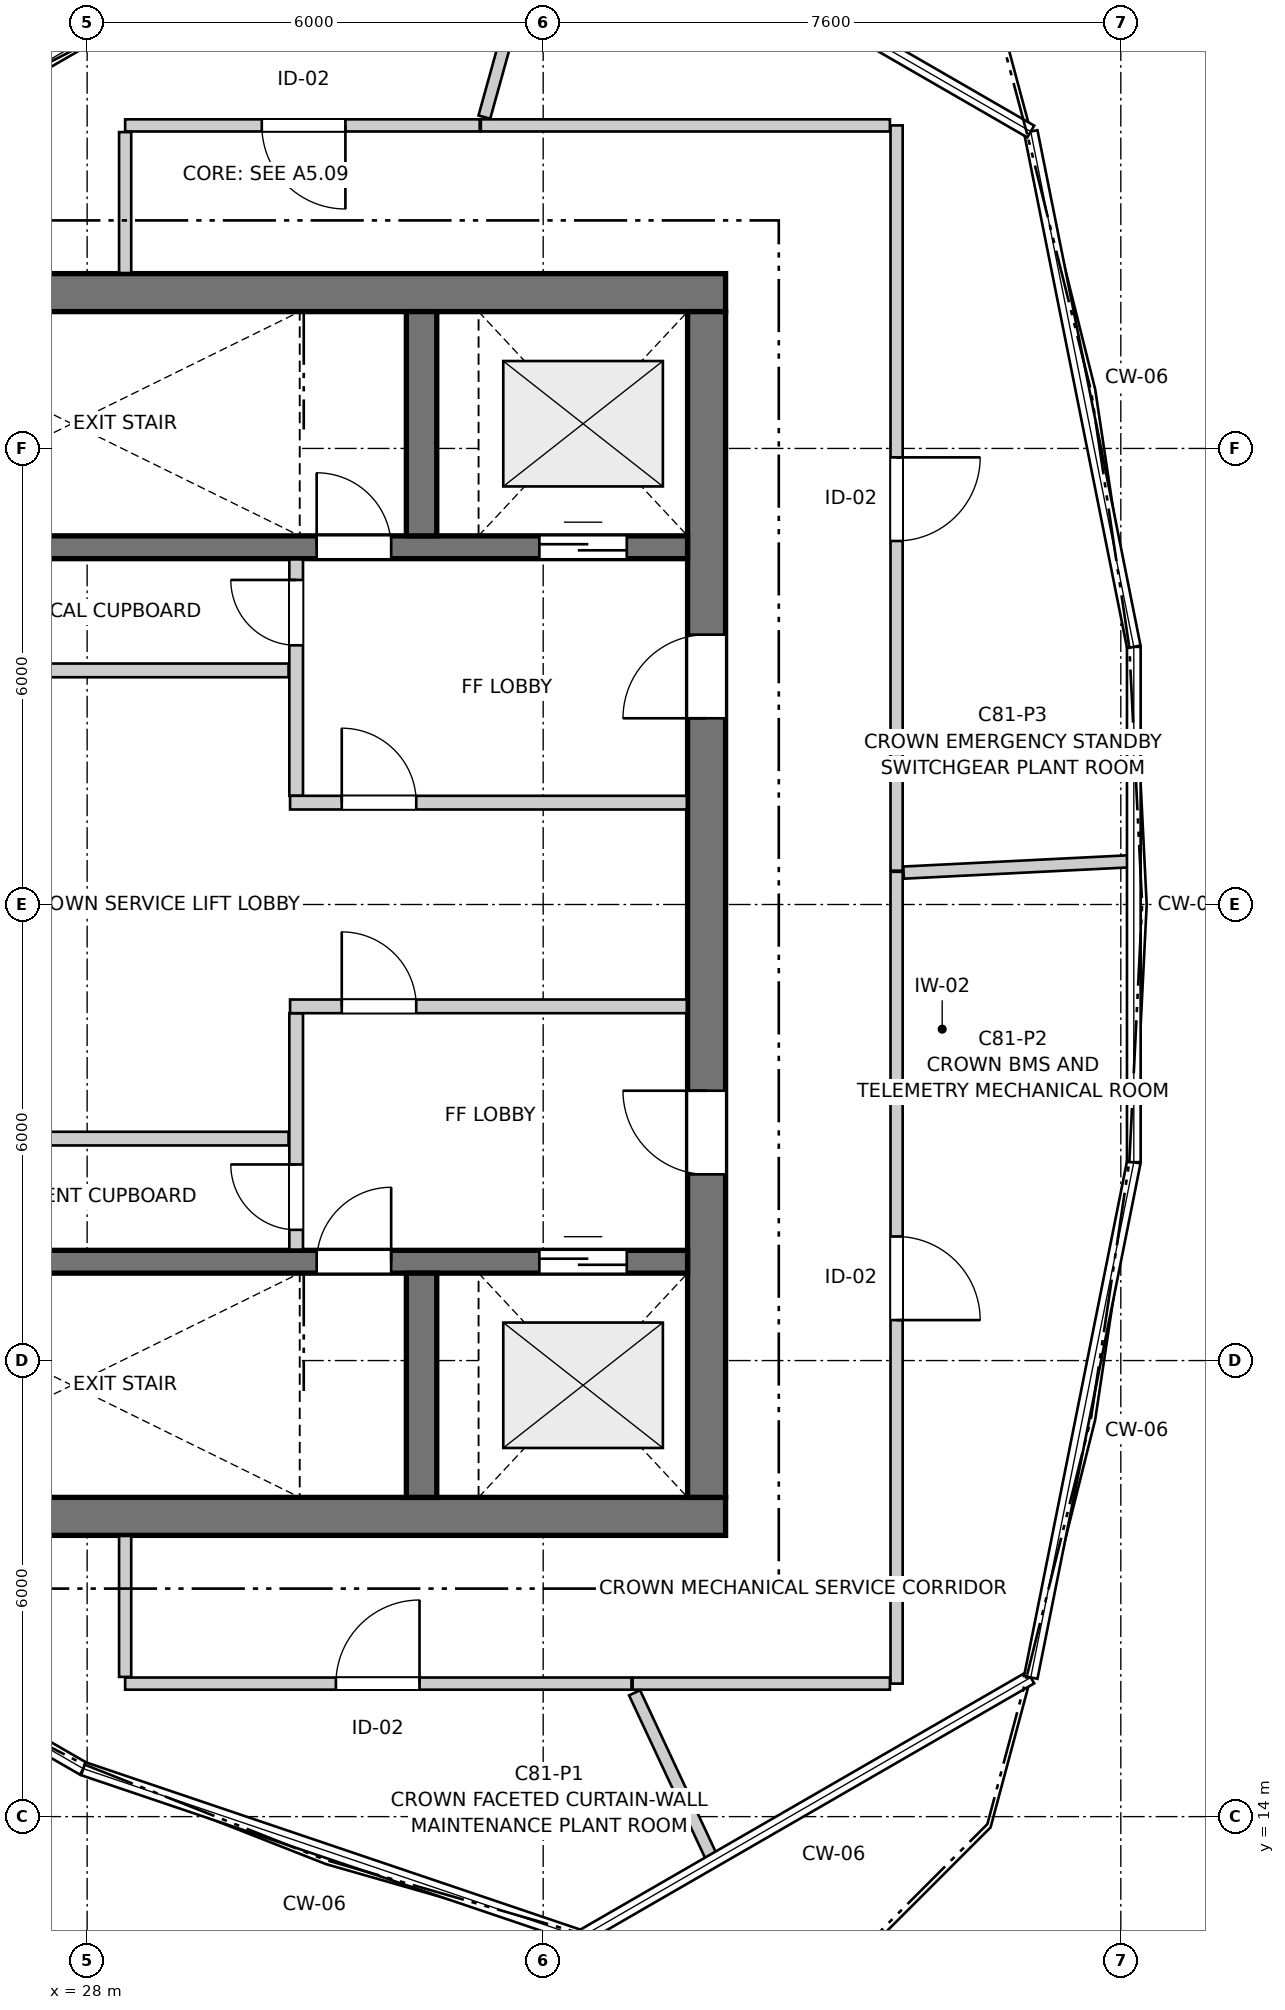
"""IFC4 building model, lengths in metres.
Left out: names, types, materials, properties, quantities, classifications, styles, units other than length and angle.
Written with IfcOpenShell. Run it as: python <this file> out.ifc"""

import sys

from ifc_helpers import new_model, si_unit, direction, frame, frame_2d, origin, place, context, subcontext, project, spatial, rectangle, extrude, source, transform, mapped, element, fill, save


model = new_model("IFC4")
c1 = context("Model", 3, precision=1e-05, world=origin(), true_north=direction((0.0, 1.0)))
c2 = subcontext(c1, "Body", "Model", "MODEL_VIEW")
j1 = project(units=[si_unit("LENGTHUNIT", "METRE"), si_unit("PLANEANGLEUNIT", "RADIAN")], contexts=[c1])
p1 = place(None, origin())
s1 = spatial("IfcSite", under=j1, at=p1, CompositionType="ELEMENT")
p2 = place(p1, origin())
s2 = spatial("IfcBuilding", under=s1, at=p2, CompositionType="ELEMENT")
p3 = place(p2, frame((0.0, 0.0, 274.7)))
s3 = spatial("IfcBuildingStorey", under=s2, at=p3, CompositionType="ELEMENT", Elevation=274.7)
for number, where, z_axis, x_axis in (
    (1, (24.3, 17.95, 0.0), (0.0, 0.0, 1.0), (1.0, 0.0, 0.0)),
    (2, (36.4, 34.05, 0.0), (0.0, 0.0, 1.0), (-1.0, 0.0, 0.0)),
):
    element("IfcWall", number, at=place(p3, frame(where, z_axis=z_axis, x_axis=x_axis)), inside=s3, PredefinedType="SHEAR", context=c2, shape_type="SweptSolid", body=[
        extrude(rectangle(XDim=12.1, YDim=0.5, at=frame_2d((6.05, 0.0))), origin(), (0.0, 0.0, 1.0), 3.062),
    ])
p4 = place(p3, frame((36.15, 18.2, 0.0), z_axis=(0.0, 0.0, 1.0), x_axis=(0.0, 1.0, 0.0)))
e3 = element("IfcWall", 3, at=p4, inside=s3, PredefinedType="SHEAR", context=c2, shape_type="SweptSolid", body=[
    extrude(rectangle(XDim=15.6, YDim=0.5, at=frame_2d((7.8, 0.0))), origin(), (0.0, 0.0, 1.0), 3.062),
])
p5 = place(p4, frame((4.25, 0.0, 0.0)))
e4 = element("IfcOpeningElement", 4, at=p5, cuts=e3, PredefinedType="OPENING", context=c2, shape_type="SweptSolid", body=[
    extrude(rectangle(XDim=1.1, YDim=2.15, at=frame_2d((0.55, 1.075))), frame((0.0, 0.26, 0.0), z_axis=(0.0, -1.0, 0.0), x_axis=(1.0, 0.0, 0.0)), (0.0, 0.0, 1.0), 0.52),
])
p6 = place(p4, frame((10.25, 0.0, 0.0)))
e5 = element("IfcOpeningElement", 5, at=p6, cuts=e3, PredefinedType="OPENING", context=c2, shape_type="SweptSolid", body=[
    extrude(rectangle(XDim=1.1, YDim=2.15, at=frame_2d((0.55, 1.075))), frame((0.0, 0.26, 0.0), z_axis=(0.0, -1.0, 0.0), x_axis=(1.0, 0.0, 0.0)), (0.0, 0.0, 1.0), 0.52),
])
p7 = place(p3, frame((24.8, 21.3, 0.0), z_axis=(0.0, 0.0, 1.0), x_axis=(1.0, 0.0, 0.0)))
e6 = element("IfcWall", 6, at=p7, inside=s3, PredefinedType="SHEAR", context=c2, shape_type="SweptSolid", body=[
    extrude(rectangle(XDim=11.1, YDim=0.3, at=frame_2d((5.55, 0.0))), origin(), (0.0, 0.0, 1.0), 3.062),
])
p8 = place(p7, frame((6.22, 0.0, 0.0)))
e7 = element("IfcOpeningElement", 7, at=p8, cuts=e6, PredefinedType="OPENING", context=c2, shape_type="SweptSolid", body=[
    extrude(rectangle(XDim=0.98, YDim=2.15, at=frame_2d((0.49, 1.075))), frame((0.0, 0.16, 0.0), z_axis=(0.0, -1.0, 0.0), x_axis=(1.0, 0.0, 0.0)), (0.0, 0.0, 1.0), 0.32),
])
p9 = place(p7, frame((9.15, 0.0, 0.0)))
e8 = element("IfcOpeningElement", 8, at=p9, cuts=e6, PredefinedType="OPENING", context=c2, shape_type="SweptSolid", body=[
    extrude(rectangle(XDim=1.15, YDim=2.15, at=frame_2d((0.575, 1.075))), frame((0.0, 0.16, 0.0), z_axis=(0.0, -1.0, 0.0), x_axis=(1.0, 0.0, 0.0)), (0.0, 0.0, 1.0), 0.32),
])
p10 = place(p3, frame((32.4, 18.2, 0.0), z_axis=(0.0, 0.0, 1.0), x_axis=(0.0, 1.0, 0.0)))
e9 = element("IfcWall", 9, at=p10, inside=s3, PredefinedType="SHEAR", context=c2, shape_type="SweptSolid", body=[
    extrude(rectangle(XDim=2.95, YDim=0.4, at=frame_2d((1.475, 0.0))), origin(), (0.0, 0.0, 1.0), 3.062),
])
p11 = place(p3, frame((24.8, 30.7, 0.0), z_axis=(0.0, 0.0, 1.0), x_axis=(1.0, 0.0, 0.0)))
e10 = element("IfcWall", 10, at=p11, inside=s3, PredefinedType="SHEAR", context=c2, shape_type="SweptSolid", body=[
    extrude(rectangle(XDim=11.1, YDim=0.3, at=frame_2d((5.55, 0.0))), origin(), (0.0, 0.0, 1.0), 3.062),
])
p12 = place(p11, frame((6.22, 0.0, 0.0)))
e11 = element("IfcOpeningElement", 11, at=p12, cuts=e10, PredefinedType="OPENING", context=c2, shape_type="SweptSolid", body=[
    extrude(rectangle(XDim=0.98, YDim=2.15, at=frame_2d((0.49, 1.075))), frame((0.0, 0.16, 0.0), z_axis=(0.0, -1.0, 0.0), x_axis=(1.0, 0.0, 0.0)), (0.0, 0.0, 1.0), 0.32),
])
p13 = place(p11, frame((9.15, 0.0, 0.0)))
e12 = element("IfcOpeningElement", 12, at=p13, cuts=e10, PredefinedType="OPENING", context=c2, shape_type="SweptSolid", body=[
    extrude(rectangle(XDim=1.15, YDim=2.15, at=frame_2d((0.575, 1.075))), frame((0.0, 0.16, 0.0), z_axis=(0.0, -1.0, 0.0), x_axis=(1.0, 0.0, 0.0)), (0.0, 0.0, 1.0), 0.32),
])
p14 = place(p3, frame((32.4, 30.85, 0.0), z_axis=(0.0, 0.0, 1.0), x_axis=(0.0, 1.0, 0.0)))
e13 = element("IfcWall", 13, at=p14, inside=s3, PredefinedType="SHEAR", context=c2, shape_type="SweptSolid", body=[
    extrude(rectangle(XDim=2.95, YDim=0.4, at=frame_2d((1.475, 0.0))), origin(), (0.0, 0.0, 1.0), 3.062),
])
p15 = place(p3, frame((30.75, 21.46, 0.0), z_axis=(0.0, 0.0, 1.0), x_axis=(0.0, 1.0, 0.0)))
e14 = element("IfcWall", 14, at=p15, inside=s3, PredefinedType="PARTITIONING", context=c2, shape_type="SweptSolid", body=[
    extrude(rectangle(XDim=3.11, YDim=0.18, at=frame_2d((1.555, 0.0))), origin(), (0.0, 0.0, 1.0), 2.23),
])
p16 = place(p15, frame((0.26, 0.0, 0.0)))
e15 = element("IfcOpeningElement", 15, at=p16, cuts=e14, PredefinedType="OPENING", context=c2, shape_type="SweptSolid", body=[
    extrude(rectangle(XDim=0.86, YDim=2.05, at=frame_2d((0.43, 1.025))), frame((0.0, 0.1, 0.0), z_axis=(0.0, -1.0, 0.0), x_axis=(1.0, 0.0, 0.0)), (0.0, 0.0, 1.0), 0.2),
])
p17 = place(p3, frame((30.67, 24.66, 0.0), z_axis=(0.0, 0.0, 1.0), x_axis=(1.0, 0.0, 0.0)))
e16 = element("IfcWall", 16, at=p17, inside=s3, PredefinedType="PARTITIONING", context=c2, shape_type="SweptSolid", body=[
    extrude(rectangle(XDim=5.22, YDim=0.18, at=frame_2d((2.61, 0.0))), origin(), (0.0, 0.0, 1.0), 2.23),
])
p18 = place(p17, frame((0.68, 0.0, 0.0)))
e17 = element("IfcOpeningElement", 17, at=p18, cuts=e16, PredefinedType="OPENING", context=c2, shape_type="SweptSolid", body=[
    extrude(rectangle(XDim=0.98, YDim=2.15, at=frame_2d((0.49, 1.075))), frame((0.0, 0.1, 0.0), z_axis=(0.0, -1.0, 0.0), x_axis=(1.0, 0.0, 0.0)), (0.0, 0.0, 1.0), 0.2),
])
p19 = place(p3, frame((30.75, 27.43, 0.0), z_axis=(0.0, 0.0, 1.0), x_axis=(0.0, 1.0, 0.0)))
e18 = element("IfcWall", 18, at=p19, inside=s3, PredefinedType="PARTITIONING", context=c2, shape_type="SweptSolid", body=[
    extrude(rectangle(XDim=3.11, YDim=0.18, at=frame_2d((1.555, 0.0))), origin(), (0.0, 0.0, 1.0), 2.23),
])
p20 = place(p19, frame((1.98, 0.0, 0.0)))
e19 = element("IfcOpeningElement", 19, at=p20, cuts=e18, PredefinedType="OPENING", context=c2, shape_type="SweptSolid", body=[
    extrude(rectangle(XDim=0.86, YDim=2.05, at=frame_2d((0.43, 1.025))), frame((0.0, 0.1, 0.0), z_axis=(0.0, -1.0, 0.0), x_axis=(1.0, 0.0, 0.0)), (0.0, 0.0, 1.0), 0.2),
])
p21 = place(p3, frame((30.67, 27.34, 0.0), z_axis=(0.0, 0.0, 1.0), x_axis=(1.0, 0.0, 0.0)))
e20 = element("IfcWall", 20, at=p21, inside=s3, PredefinedType="PARTITIONING", context=c2, shape_type="SweptSolid", body=[
    extrude(rectangle(XDim=5.22, YDim=0.18, at=frame_2d((2.61, 0.0))), origin(), (0.0, 0.0, 1.0), 2.23),
])
p22 = place(p21, frame((0.68, 0.0, 0.0)))
e21 = element("IfcOpeningElement", 21, at=p22, cuts=e20, PredefinedType="OPENING", context=c2, shape_type="SweptSolid", body=[
    extrude(rectangle(XDim=0.98, YDim=2.15, at=frame_2d((0.49, 1.075))), frame((0.0, 0.1, 0.0), z_axis=(0.0, -1.0, 0.0), x_axis=(1.0, 0.0, 0.0)), (0.0, 0.0, 1.0), 0.2),
])
for number, where, z_axis, x_axis in (
    (22, (24.81, 22.92, 0.0), (0.0, 0.0, 1.0), (1.0, 0.0, 0.0)),
    (23, (24.81, 29.08, 0.0), (0.0, 0.0, 1.0), (1.0, 0.0, 0.0)),
):
    element("IfcWall", number, at=place(p3, frame(where, z_axis=z_axis, x_axis=x_axis)), inside=s3, PredefinedType="PARTITIONING", context=c2, shape_type="SweptSolid", body=[
        extrude(rectangle(XDim=5.84, YDim=0.18, at=frame_2d((2.92, 0.0))), origin(), (0.0, 0.0, 1.0), 2.23),
    ])
p23 = place(p3, frame((38.65, 26.43, 0.0), z_axis=(0.0, 0.0, 1.0), x_axis=(0.0, -1.0, 0.0)))
e24 = element("IfcWall", 24, at=p23, inside=s3, PredefinedType="PARTITIONING", context=c2, shape_type="SweptSolid", body=[
    extrude(rectangle(XDim=10.68, YDim=0.16, at=frame_2d((5.34, 0.0))), origin(), (0.0, 0.0, 1.0), 2.23),
])
p24 = place(p23, frame((4.798, 0.0, 0.0)))
e25 = element("IfcOpeningElement", 25, at=p24, cuts=e24, PredefinedType="OPENING", context=c2, shape_type="SweptSolid", body=[
    extrude(rectangle(XDim=1.1, YDim=2.15, at=frame_2d((0.55, 1.075))), frame((0.0, 0.09, 0.0), z_axis=(0.0, -1.0, 0.0), x_axis=(1.0, 0.0, 0.0)), (0.0, 0.0, 1.0), 0.18),
])
p25 = place(p3, frame((38.65, 36.25, 0.0), z_axis=(0.0, 0.0, 1.0), x_axis=(0.0, -1.0, 0.0)))
e26 = element("IfcWall", 26, at=p25, inside=s3, PredefinedType="PARTITIONING", context=c2, shape_type="SweptSolid", body=[
    extrude(rectangle(XDim=9.805, YDim=0.16, at=frame_2d((4.902, 0.0))), origin(), (0.0, 0.0, 1.0), 2.23),
])
p26 = place(p25, frame((4.367, 0.0, 0.0)))
e27 = element("IfcOpeningElement", 27, at=p26, cuts=e26, PredefinedType="OPENING", context=c2, shape_type="SweptSolid", body=[
    extrude(rectangle(XDim=1.1, YDim=2.15, at=frame_2d((0.55, 1.075))), frame((0.0, 0.09, 0.0), z_axis=(0.0, -1.0, 0.0), x_axis=(1.0, 0.0, 0.0)), (0.0, 0.0, 1.0), 0.18),
])
p27 = place(p3, frame((28.5, 15.75, 0.0), z_axis=(0.0, 0.0, 1.0), x_axis=(1.0, 0.0, 0.0)))
e28 = element("IfcWall", 28, at=p27, inside=s3, PredefinedType="PARTITIONING", context=c2, shape_type="SweptSolid", body=[
    extrude(rectangle(XDim=6.662, YDim=0.16, at=frame_2d((3.331, 0.0))), origin(), (0.0, 0.0, 1.0), 2.23),
])
p28 = place(p27, frame((2.773, 0.0, 0.0)))
e29 = element("IfcOpeningElement", 29, at=p28, cuts=e28, PredefinedType="OPENING", context=c2, shape_type="SweptSolid", body=[
    extrude(rectangle(XDim=1.1, YDim=2.15, at=frame_2d((0.55, 1.075))), frame((0.0, 0.09, 0.0), z_axis=(0.0, -1.0, 0.0), x_axis=(1.0, 0.0, 0.0)), (0.0, 0.0, 1.0), 0.18),
])
p29 = place(p3, frame((33.165, 36.25, 0.0), z_axis=(0.0, 0.0, 1.0), x_axis=(-1.0, 0.0, 0.0)))
e30 = element("IfcWall", 30, at=p29, inside=s3, PredefinedType="PARTITIONING", context=c2, shape_type="SweptSolid", body=[
    extrude(rectangle(XDim=4.665, YDim=0.16, at=frame_2d((2.333, 0.0))), origin(), (0.0, 0.0, 1.0), 2.23),
])
p30 = place(p29, frame((1.767, 0.0, 0.0)))
e31 = element("IfcOpeningElement", 31, at=p30, cuts=e30, PredefinedType="OPENING", context=c2, shape_type="SweptSolid", body=[
    extrude(rectangle(XDim=1.1, YDim=2.15, at=frame_2d((0.55, 1.075))), frame((0.0, 0.09, 0.0), z_axis=(0.0, -1.0, 0.0), x_axis=(1.0, 0.0, 0.0)), (0.0, 0.0, 1.0), 0.18),
])
p31 = place(p3, frame((33.18, 36.25, 0.0), z_axis=(0.0, 0.0, 1.0), x_axis=(1.0, 0.0, 0.0)))
e32 = element("IfcWall", 32, at=p31, inside=s3, PredefinedType="PARTITIONING", context=c2, shape_type="SweptSolid", body=[
    extrude(rectangle(XDim=5.382, YDim=0.16, at=frame_2d((2.691, 0.0))), origin(), (0.0, 0.0, 1.0), 2.23),
])
p32 = place(p3, frame((35.177, 15.75, 0.0), z_axis=(0.0, 0.0, 1.0), x_axis=(1.0, 0.0, 0.0)))
e33 = element("IfcWall", 33, at=p32, inside=s3, PredefinedType="PARTITIONING", context=c2, shape_type="SweptSolid", body=[
    extrude(rectangle(XDim=3.385, YDim=0.16, at=frame_2d((1.692, 0.0))), origin(), (0.0, 0.0, 1.0), 2.23),
])
p33 = place(p3, frame((33.226, 36.359, 0.0), z_axis=(0.0, 0.0, 1.0), x_axis=(0.267310296681, 0.96361050497, 0.0)))
e34 = element("IfcWall", 34, at=p33, inside=s3, PredefinedType="PARTITIONING", context=c2, shape_type="SweptSolid", body=[
    extrude(rectangle(XDim=3.171, YDim=0.16, at=frame_2d((1.585, 0.0))), origin(), (0.0, 0.0, 1.0), 2.23),
])
p34 = place(p3, frame((38.742, 26.42, 0.0), z_axis=(0.0, 0.0, 1.0), x_axis=(0.998747676097, 0.050030785433, 0.0)))
e35 = element("IfcWall", 35, at=p34, inside=s3, PredefinedType="PARTITIONING", context=c2, shape_type="SweptSolid", body=[
    extrude(rectangle(XDim=3.006, YDim=0.16, at=frame_2d((1.503, 0.0))), origin(), (0.0, 0.0, 1.0), 2.23),
])
p35 = place(p3, frame((35.203, 15.629, 0.0), z_axis=(0.0, 0.0, 1.0), x_axis=(0.423632901081, -0.905833961122, 0.0)))
e36 = element("IfcWall", 36, at=p35, inside=s3, PredefinedType="PARTITIONING", context=c2, shape_type="SweptSolid", body=[
    extrude(rectangle(XDim=2.414, YDim=0.16, at=frame_2d((1.207, 0.0))), origin(), (0.0, 0.0, 1.0), 2.23),
])
for number, where, z_axis, x_axis in (
    (37, (28.5, 34.308, 0.0), (0.0, 0.0, 1.0), (0.0, 1.0, 0.0)),
    (38, (28.5, 15.838, 0.0), (0.0, 0.0, 1.0), (0.0, 1.0, 0.0)),
):
    element("IfcWall", number, at=place(p3, frame(where, z_axis=z_axis, x_axis=x_axis)), inside=s3, PredefinedType="PARTITIONING", context=c2, shape_type="SweptSolid", body=[
        extrude(rectangle(XDim=1.854, YDim=0.16, at=frame_2d((0.927, 0.0))), origin(), (0.0, 0.0, 1.0), 2.23),
    ])
m1 = source(origin(), c2, "Body", "SweptSolid", [
    extrude(rectangle(XDim=0.98, YDim=2.15, at=frame_2d((0.49, 1.075))), frame((0.0, 0.025, 0.0), z_axis=(0.0, -1.0, 0.0), x_axis=(1.0, 0.0, 0.0)), (0.0, 0.0, 1.0), 0.05),
])
p36 = place(p8, origin())
e39 = element("IfcDoor", 39, at=p36, inside=s3, OperationType="SINGLE_SWING_RIGHT", PredefinedType="DOOR", context=c2, shape_type="MappedRepresentation", body=[
    mapped(m1, transform((0.0, 0.0, 0.0), x_axis=(1.0, 0.0, 0.0), y_axis=(0.0, 1.0, 0.0), z_axis=(0.0, 0.0, 1.0), scale=1.0)),
])
fill(e7, e39)
m2 = source(origin(), c2, "Body", "SweptSolid", [
    extrude(rectangle(XDim=1.15, YDim=2.15, at=frame_2d((0.575, 1.075))), frame((0.0, 0.025, 0.0), z_axis=(0.0, -1.0, 0.0), x_axis=(1.0, 0.0, 0.0)), (0.0, 0.0, 1.0), 0.05),
])
p37 = place(p9, origin())
e40 = element("IfcDoor", 40, at=p37, inside=s3, OperationType="DOUBLE_DOOR_SLIDING", PredefinedType="DOOR", context=c2, shape_type="MappedRepresentation", body=[
    mapped(m2, transform((0.0, 0.0, 0.0), x_axis=(1.0, 0.0, 0.0), y_axis=(0.0, 1.0, 0.0), z_axis=(0.0, 0.0, 1.0), scale=1.0)),
])
fill(e8, e40)
p38 = place(p12, origin())
e41 = element("IfcDoor", 41, at=p38, inside=s3, OperationType="SINGLE_SWING_LEFT", PredefinedType="DOOR", context=c2, shape_type="MappedRepresentation", body=[
    mapped(m1, transform((0.0, 0.0, 0.0), x_axis=(1.0, 0.0, 0.0), y_axis=(0.0, 1.0, 0.0), z_axis=(0.0, 0.0, 1.0), scale=1.0)),
])
fill(e11, e41)
p39 = place(p13, origin())
e42 = element("IfcDoor", 42, at=p39, inside=s3, OperationType="DOUBLE_DOOR_SLIDING", PredefinedType="DOOR", context=c2, shape_type="MappedRepresentation", body=[
    mapped(m2, transform((0.0, 0.0, 0.0), x_axis=(1.0, 0.0, 0.0), y_axis=(0.0, 1.0, 0.0), z_axis=(0.0, 0.0, 1.0), scale=1.0)),
])
fill(e12, e42)
m3 = source(origin(), c2, "Body", "SweptSolid", [
    extrude(rectangle(XDim=1.1, YDim=2.15, at=frame_2d((0.55, 1.075))), frame((0.0, 0.025, 0.0), z_axis=(0.0, -1.0, 0.0), x_axis=(1.0, 0.0, 0.0)), (0.0, 0.0, 1.0), 0.05),
])
p40 = place(p5, origin())
e43 = element("IfcDoor", 43, at=p40, inside=s3, OperationType="SINGLE_SWING_RIGHT", PredefinedType="DOOR", context=c2, shape_type="MappedRepresentation", body=[
    mapped(m3, transform((0.0, 0.0, 0.0), x_axis=(1.0, 0.0, 0.0), y_axis=(0.0, 1.0, 0.0), z_axis=(0.0, 0.0, 1.0), scale=1.0)),
])
fill(e4, e43)
p41 = place(p6, origin())
e44 = element("IfcDoor", 44, at=p41, inside=s3, OperationType="SINGLE_SWING_LEFT", PredefinedType="DOOR", context=c2, shape_type="MappedRepresentation", body=[
    mapped(m3, transform((0.0, 0.0, 0.0), x_axis=(1.0, 0.0, 0.0), y_axis=(0.0, 1.0, 0.0), z_axis=(0.0, 0.0, 1.0), scale=1.0)),
])
fill(e5, e44)
m4 = source(origin(), c2, "Body", "SweptSolid", [
    extrude(rectangle(XDim=0.86, YDim=2.05, at=frame_2d((0.43, 1.025))), frame((0.0, 0.025, 0.0), z_axis=(0.0, -1.0, 0.0), x_axis=(1.0, 0.0, 0.0)), (0.0, 0.0, 1.0), 0.05),
])
p42 = place(p16, origin())
e45 = element("IfcDoor", 45, at=p42, inside=s3, OperationType="SINGLE_SWING_RIGHT", PredefinedType="DOOR", context=c2, shape_type="MappedRepresentation", body=[
    mapped(m4, transform((0.0, 0.0, 0.0), x_axis=(1.0, 0.0, 0.0), y_axis=(0.0, 1.0, 0.0), z_axis=(0.0, 0.0, 1.0), scale=1.0)),
])
fill(e15, e45)
p43 = place(p18, origin())
e46 = element("IfcDoor", 46, at=p43, inside=s3, OperationType="SINGLE_SWING_LEFT", PredefinedType="DOOR", context=c2, shape_type="MappedRepresentation", body=[
    mapped(m1, transform((0.0, 0.0, 0.0), x_axis=(1.0, 0.0, 0.0), y_axis=(0.0, 1.0, 0.0), z_axis=(0.0, 0.0, 1.0), scale=1.0)),
])
fill(e17, e46)
p44 = place(p20, origin())
e47 = element("IfcDoor", 47, at=p44, inside=s3, OperationType="SINGLE_SWING_RIGHT", PredefinedType="DOOR", context=c2, shape_type="MappedRepresentation", body=[
    mapped(m4, transform((0.0, 0.0, 0.0), x_axis=(1.0, 0.0, 0.0), y_axis=(0.0, 1.0, 0.0), z_axis=(0.0, 0.0, 1.0), scale=1.0)),
])
fill(e19, e47)
p45 = place(p22, origin())
e48 = element("IfcDoor", 48, at=p45, inside=s3, OperationType="SINGLE_SWING_LEFT", PredefinedType="DOOR", context=c2, shape_type="MappedRepresentation", body=[
    mapped(m1, transform((0.0, 0.0, 0.0), x_axis=(1.0, 0.0, 0.0), y_axis=(0.0, 1.0, 0.0), z_axis=(0.0, 0.0, 1.0), scale=1.0)),
])
fill(e21, e48)
p46 = place(p24, origin())
e49 = element("IfcDoor", 49, at=p46, inside=s3, OperationType="SINGLE_SWING_RIGHT", PredefinedType="DOOR", context=c2, shape_type="MappedRepresentation", body=[
    mapped(m3, transform((0.0, 0.0, 0.0), x_axis=(1.0, 0.0, 0.0), y_axis=(0.0, 1.0, 0.0), z_axis=(0.0, 0.0, 1.0), scale=1.0)),
])
fill(e25, e49)
p47 = place(p26, origin())
e50 = element("IfcDoor", 50, at=p47, inside=s3, OperationType="SINGLE_SWING_LEFT", PredefinedType="DOOR", context=c2, shape_type="MappedRepresentation", body=[
    mapped(m3, transform((0.0, 0.0, 0.0), x_axis=(1.0, 0.0, 0.0), y_axis=(0.0, 1.0, 0.0), z_axis=(0.0, 0.0, 1.0), scale=1.0)),
])
fill(e27, e50)
p48 = place(p28, origin())
e51 = element("IfcDoor", 51, at=p48, inside=s3, OperationType="SINGLE_SWING_RIGHT", PredefinedType="DOOR", context=c2, shape_type="MappedRepresentation", body=[
    mapped(m3, transform((0.0, 0.0, 0.0), x_axis=(1.0, 0.0, 0.0), y_axis=(0.0, 1.0, 0.0), z_axis=(0.0, 0.0, 1.0), scale=1.0)),
])
fill(e29, e51)
p49 = place(p30, origin())
e52 = element("IfcDoor", 52, at=p49, inside=s3, OperationType="SINGLE_SWING_LEFT", PredefinedType="DOOR", context=c2, shape_type="MappedRepresentation", body=[
    mapped(m3, transform((0.0, 0.0, 0.0), x_axis=(1.0, 0.0, 0.0), y_axis=(0.0, 1.0, 0.0), z_axis=(0.0, 0.0, 1.0), scale=1.0)),
])
fill(e31, e52)
save(model, sys.argv[1])
